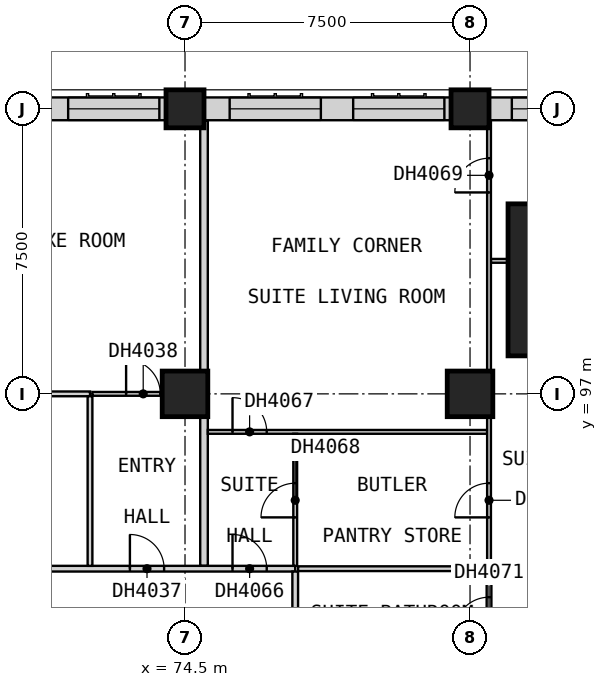
"""IFC4 building model, lengths in metres.
Left out: names, types, materials, properties, quantities, classifications, styles, units other than length and angle.
Written with IfcOpenShell. Run it as: python <this file> out.ifc"""

import sys

from ifc_helpers import new_model, si_unit, direction, frame, frame_2d, origin, origin_2d, place, context, subcontext, project, spatial, rectangle, extrude, element, fill, save


model = new_model("IFC4")
c1 = context("Model", 3, precision=1e-05, world=origin(), true_north=direction((0.0, 1.0)))
c2 = subcontext(c1, "Body", "Model", "MODEL_VIEW")
j1 = project(units=[si_unit("LENGTHUNIT", "METRE"), si_unit("PLANEANGLEUNIT", "RADIAN")], contexts=[c1])
p1 = place(None, origin())
s1 = spatial("IfcSite", under=j1, at=p1, CompositionType="ELEMENT")
p2 = place(p1, origin())
s2 = spatial("IfcBuilding", under=s1, at=p2, CompositionType="ELEMENT")
p3 = place(p2, frame((0.0, 0.0, 44.8)))
s3 = spatial("IfcBuildingStorey", under=s2, at=p3, CompositionType="ELEMENT", Elevation=44.8)
p4 = place(p3, frame((74.5, 97.0, 0.0), z_axis=(0.0, 0.0, 1.0), x_axis=(1.0, 0.0, 0.0)))
e1 = element("IfcColumn", 1, at=p4, inside=s3, PredefinedType="COLUMN", context=c2, shape_type="SweptSolid", body=[
    extrude(rectangle(XDim=1.2, YDim=1.2, at=origin_2d()), origin(), (0.0, 0.0, 1.0), 3.6),
])
p5 = place(p3, frame((74.5, 104.5, 0.0), z_axis=(0.0, 0.0, 1.0), x_axis=(1.0, 0.0, 0.0)))
e2 = element("IfcColumn", 2, at=p5, inside=s3, PredefinedType="COLUMN", context=c2, shape_type="SweptSolid", body=[
    extrude(rectangle(XDim=1.0, YDim=1.0, at=origin_2d()), origin(), (0.0, 0.0, 1.0), 3.6),
])
p6 = place(p3, frame((82.0, 97.0, 0.0), z_axis=(0.0, 0.0, 1.0), x_axis=(1.0, 0.0, 0.0)))
e3 = element("IfcColumn", 3, at=p6, inside=s3, PredefinedType="COLUMN", context=c2, shape_type="SweptSolid", body=[
    extrude(rectangle(XDim=1.2, YDim=1.2, at=origin_2d()), origin(), (0.0, 0.0, 1.0), 3.6),
])
p7 = place(p3, frame((82.0, 104.5, 0.0), z_axis=(0.0, 0.0, 1.0), x_axis=(1.0, 0.0, 0.0)))
e4 = element("IfcColumn", 4, at=p7, inside=s3, PredefinedType="COLUMN", context=c2, shape_type="SweptSolid", body=[
    extrude(rectangle(XDim=1.0, YDim=1.0, at=origin_2d()), origin(), (0.0, 0.0, 1.0), 3.6),
])
p8 = place(p3, frame((85.0, 100.0, 0.0), z_axis=(0.0, 0.0, 1.0), x_axis=(1.0, 0.0, 0.0)))
e5 = element("IfcColumn", 5, at=p8, inside=s3, PredefinedType="COLUMN", context=c2, shape_type="SweptSolid", body=[
    extrude(rectangle(XDim=4.0, YDim=4.0, at=origin_2d()), origin(), (0.0, 0.0, 1.0), 3.6),
])
p9 = place(p3, frame((87.0, 104.5, 0.0), z_axis=(0.0, 0.0, 1.0), x_axis=(-1.0, 0.0, 0.0)))
e6 = element("IfcWall", 6, at=p9, inside=s3, PredefinedType="SOLIDWALL", context=c2, shape_type="SweptSolid", body=[
    extrude(rectangle(XDim=4.5, YDim=0.6, at=frame_2d((2.25, 0.0))), origin(), (0.0, 0.0, 1.0), 3.35),
])
p10 = place(p9, frame((1.5, 0.0, 0.8)))
e7 = element("IfcOpeningElement", 7, at=p10, cuts=e6, PredefinedType="OPENING", context=c2, shape_type="SweptSolid", body=[
    extrude(rectangle(XDim=2.4, YDim=1.8, at=frame_2d((1.2, 0.9))), frame((0.0, 0.31, 0.0), z_axis=(0.0, -1.0, 0.0), x_axis=(1.0, 0.0, 0.0)), (0.0, 0.0, 1.0), 0.62),
])
p11 = place(p3, frame((81.5, 104.5, 0.0), z_axis=(0.0, 0.0, 1.0), x_axis=(-1.0, 0.0, 0.0)))
e8 = element("IfcWall", 8, at=p11, inside=s3, PredefinedType="SOLIDWALL", context=c2, shape_type="SweptSolid", body=[
    extrude(rectangle(XDim=6.5, YDim=0.6, at=frame_2d((3.25, 0.0))), origin(), (0.0, 0.0, 1.0), 2.85),
])
p12 = place(p11, frame((3.425, 0.0, 0.8)))
e9 = element("IfcOpeningElement", 9, at=p12, cuts=e8, PredefinedType="OPENING", context=c2, shape_type="SweptSolid", body=[
    extrude(rectangle(XDim=2.4, YDim=1.8, at=frame_2d((1.2, 0.9))), frame((0.0, 0.31, 0.0), z_axis=(0.0, -1.0, 0.0), x_axis=(1.0, 0.0, 0.0)), (0.0, 0.0, 1.0), 0.62),
])
p13 = place(p11, frame((0.175, 0.0, 0.8)))
e10 = element("IfcOpeningElement", 10, at=p13, cuts=e8, PredefinedType="OPENING", context=c2, shape_type="SweptSolid", body=[
    extrude(rectangle(XDim=2.4, YDim=1.8, at=frame_2d((1.2, 0.9))), frame((0.0, 0.31, 0.0), z_axis=(0.0, -1.0, 0.0), x_axis=(1.0, 0.0, 0.0)), (0.0, 0.0, 1.0), 0.62),
])
p14 = place(p3, frame((74.0, 104.5, 0.0), z_axis=(0.0, 0.0, 1.0), x_axis=(-1.0, 0.0, 0.0)))
e11 = element("IfcWall", 11, at=p14, inside=s3, PredefinedType="SOLIDWALL", context=c2, shape_type="SweptSolid", body=[
    extrude(rectangle(XDim=6.0, YDim=0.6, at=frame_2d((3.0, 0.0))), origin(), (0.0, 0.0, 1.0), 2.85),
])
p15 = place(p14, frame((3.175, 0.0, 0.8)))
e12 = element("IfcOpeningElement", 12, at=p15, cuts=e11, PredefinedType="OPENING", context=c2, shape_type="SweptSolid", body=[
    extrude(rectangle(XDim=2.4, YDim=1.8, at=frame_2d((1.2, 0.9))), frame((0.0, 0.31, 0.0), z_axis=(0.0, -1.0, 0.0), x_axis=(1.0, 0.0, 0.0)), (0.0, 0.0, 1.0), 0.62),
])
p16 = place(p14, frame((0.175, 0.0, 0.8)))
e13 = element("IfcOpeningElement", 13, at=p16, cuts=e11, PredefinedType="OPENING", context=c2, shape_type="SweptSolid", body=[
    extrude(rectangle(XDim=2.4, YDim=1.8, at=frame_2d((1.2, 0.9))), frame((0.0, 0.31, 0.0), z_axis=(0.0, -1.0, 0.0), x_axis=(1.0, 0.0, 0.0)), (0.0, 0.0, 1.0), 0.62),
])
p17 = place(p3, frame((75.0, 92.475, 0.0), z_axis=(0.0, 0.0, 1.0), x_axis=(0.0, 1.0, 0.0)))
e14 = element("IfcWall", 14, at=p17, inside=s3, PredefinedType="PARTITIONING", context=c2, shape_type="SweptSolid", body=[
    extrude(rectangle(XDim=11.715, YDim=0.2, at=frame_2d((5.857, 0.0))), origin(), (0.0, 0.0, 1.0), 3.35),
])
p18 = place(p3, frame((33.75, 92.4, 0.0), z_axis=(0.0, 0.0, 1.0), x_axis=(1.0, 0.0, 0.0)))
e15 = element("IfcWall", 15, at=p18, inside=s3, PredefinedType="PARTITIONING", context=c2, shape_type="SweptSolid", body=[
    extrude(rectangle(XDim=43.65, YDim=0.15, at=frame_2d((21.825, 0.0))), origin(), (0.0, 0.0, 1.0), 3.35),
])
p19 = place(p18, frame((5.175, 0.0, 0.0)))
e16 = element("IfcOpeningElement", 16, at=p19, cuts=e15, PredefinedType="OPENING", context=c2, shape_type="SweptSolid", body=[
    extrude(rectangle(XDim=0.9, YDim=2.1, at=frame_2d((0.45, 1.05))), frame((0.0, 0.085, 0.0), z_axis=(0.0, -1.0, 0.0), x_axis=(1.0, 0.0, 0.0)), (0.0, 0.0, 1.0), 0.17),
])
p20 = place(p18, frame((13.188, 0.0, 0.0)))
e17 = element("IfcOpeningElement", 17, at=p20, cuts=e15, PredefinedType="OPENING", context=c2, shape_type="SweptSolid", body=[
    extrude(rectangle(XDim=1.0, YDim=2.1, at=frame_2d((0.5, 1.05))), frame((0.0, 0.085, 0.0), z_axis=(0.0, -1.0, 0.0), x_axis=(1.0, 0.0, 0.0)), (0.0, 0.0, 1.0), 0.17),
])
p21 = place(p18, frame((20.55, 0.0, 0.0)))
e18 = element("IfcOpeningElement", 18, at=p21, cuts=e15, PredefinedType="OPENING", context=c2, shape_type="SweptSolid", body=[
    extrude(rectangle(XDim=0.9, YDim=2.1, at=frame_2d((0.45, 1.05))), frame((0.0, 0.085, 0.0), z_axis=(0.0, -1.0, 0.0), x_axis=(1.0, 0.0, 0.0)), (0.0, 0.0, 1.0), 0.17),
])
p22 = place(p18, frame((24.863, 0.0, 0.0)))
e19 = element("IfcOpeningElement", 19, at=p22, cuts=e15, PredefinedType="OPENING", context=c2, shape_type="SweptSolid", body=[
    extrude(rectangle(XDim=0.9, YDim=2.1, at=frame_2d((0.45, 1.05))), frame((0.0, 0.085, 0.0), z_axis=(0.0, -1.0, 0.0), x_axis=(1.0, 0.0, 0.0)), (0.0, 0.0, 1.0), 0.17),
])
p23 = place(p18, frame((31.8, 0.0, 0.0)))
e20 = element("IfcOpeningElement", 20, at=p23, cuts=e15, PredefinedType="OPENING", context=c2, shape_type="SweptSolid", body=[
    extrude(rectangle(XDim=0.9, YDim=2.1, at=frame_2d((0.45, 1.05))), frame((0.0, 0.085, 0.0), z_axis=(0.0, -1.0, 0.0), x_axis=(1.0, 0.0, 0.0)), (0.0, 0.0, 1.0), 0.17),
])
p24 = place(p18, frame((39.3, 0.0, 0.0)))
e21 = element("IfcOpeningElement", 21, at=p24, cuts=e15, PredefinedType="OPENING", context=c2, shape_type="SweptSolid", body=[
    extrude(rectangle(XDim=0.9, YDim=2.1, at=frame_2d((0.45, 1.05))), frame((0.0, 0.085, 0.0), z_axis=(0.0, -1.0, 0.0), x_axis=(1.0, 0.0, 0.0)), (0.0, 0.0, 1.0), 0.17),
])
p25 = place(p18, frame((42.0, 0.0, 0.0)))
e22 = element("IfcOpeningElement", 22, at=p25, cuts=e15, PredefinedType="OPENING", context=c2, shape_type="SweptSolid", body=[
    extrude(rectangle(XDim=0.9, YDim=2.1, at=frame_2d((0.45, 1.05))), frame((0.0, 0.085, 0.0), z_axis=(0.0, -1.0, 0.0), x_axis=(1.0, 0.0, 0.0)), (0.0, 0.0, 1.0), 0.17),
])
p26 = place(p3, frame((77.4, 50.175, 0.0), z_axis=(0.0, 0.0, 1.0), x_axis=(0.0, 1.0, 0.0)))
e23 = element("IfcWall", 23, at=p26, inside=s3, PredefinedType="PARTITIONING", context=c2, shape_type="SweptSolid", body=[
    extrude(rectangle(XDim=42.15, YDim=0.15, at=frame_2d((21.075, 0.0))), origin(), (0.0, 0.0, 1.0), 3.35),
])
p27 = place(p26, frame((8.012, 0.0, 0.0)))
e24 = element("IfcOpeningElement", 24, at=p27, cuts=e23, PredefinedType="OPENING", context=c2, shape_type="SweptSolid", body=[
    extrude(rectangle(XDim=1.0, YDim=2.1, at=frame_2d((0.5, 1.05))), frame((0.0, 0.085, 0.0), z_axis=(0.0, -1.0, 0.0), x_axis=(1.0, 0.0, 0.0)), (0.0, 0.0, 1.0), 0.17),
])
p28 = place(p26, frame((12.188, 0.0, 0.0)))
e25 = element("IfcOpeningElement", 25, at=p28, cuts=e23, PredefinedType="OPENING", context=c2, shape_type="SweptSolid", body=[
    extrude(rectangle(XDim=0.9, YDim=2.1, at=frame_2d((0.45, 1.05))), frame((0.0, 0.085, 0.0), z_axis=(0.0, -1.0, 0.0), x_axis=(1.0, 0.0, 0.0)), (0.0, 0.0, 1.0), 0.17),
])
p29 = place(p26, frame((19.125, 0.0, 0.0)))
e26 = element("IfcOpeningElement", 26, at=p29, cuts=e23, PredefinedType="OPENING", context=c2, shape_type="SweptSolid", body=[
    extrude(rectangle(XDim=0.9, YDim=2.1, at=frame_2d((0.45, 1.05))), frame((0.0, 0.085, 0.0), z_axis=(0.0, -1.0, 0.0), x_axis=(1.0, 0.0, 0.0)), (0.0, 0.0, 1.0), 0.17),
])
p30 = place(p26, frame((26.625, 0.0, 0.0)))
e27 = element("IfcOpeningElement", 27, at=p30, cuts=e23, PredefinedType="OPENING", context=c2, shape_type="SweptSolid", body=[
    extrude(rectangle(XDim=0.9, YDim=2.1, at=frame_2d((0.45, 1.05))), frame((0.0, 0.085, 0.0), z_axis=(0.0, -1.0, 0.0), x_axis=(1.0, 0.0, 0.0)), (0.0, 0.0, 1.0), 0.17),
])
p31 = place(p26, frame((30.938, 0.0, 0.0)))
e28 = element("IfcOpeningElement", 28, at=p31, cuts=e23, PredefinedType="OPENING", context=c2, shape_type="SweptSolid", body=[
    extrude(rectangle(XDim=0.9, YDim=2.1, at=frame_2d((0.45, 1.05))), frame((0.0, 0.085, 0.0), z_axis=(0.0, -1.0, 0.0), x_axis=(1.0, 0.0, 0.0)), (0.0, 0.0, 1.0), 0.17),
])
p32 = place(p26, frame((34.688, 0.0, 0.0)))
e29 = element("IfcOpeningElement", 29, at=p32, cuts=e23, PredefinedType="OPENING", context=c2, shape_type="SweptSolid", body=[
    extrude(rectangle(XDim=0.9, YDim=2.1, at=frame_2d((0.45, 1.05))), frame((0.0, 0.085, 0.0), z_axis=(0.0, -1.0, 0.0), x_axis=(1.0, 0.0, 0.0)), (0.0, 0.0, 1.0), 0.17),
])
p33 = place(p26, frame((38.438, 0.0, 0.0)))
e30 = element("IfcOpeningElement", 30, at=p33, cuts=e23, PredefinedType="OPENING", context=c2, shape_type="SweptSolid", body=[
    extrude(rectangle(XDim=0.9, YDim=2.1, at=frame_2d((0.45, 1.05))), frame((0.0, 0.085, 0.0), z_axis=(0.0, -1.0, 0.0), x_axis=(1.0, 0.0, 0.0)), (0.0, 0.0, 1.0), 0.17),
])
p34 = place(p3, frame((75.1, 96.0, 0.0), z_axis=(0.0, 0.0, 1.0), x_axis=(1.0, 0.0, 0.0)))
e31 = element("IfcWall", 31, at=p34, inside=s3, PredefinedType="PARTITIONING", context=c2, shape_type="SweptSolid", body=[
    extrude(rectangle(XDim=7.35, YDim=0.1, at=frame_2d((3.675, 0.0))), origin(), (0.0, 0.0, 1.0), 3.35),
])
p35 = place(p34, frame((0.65, 0.0, 0.0)))
e32 = element("IfcOpeningElement", 32, at=p35, cuts=e31, PredefinedType="OPENING", context=c2, shape_type="SweptSolid", body=[
    extrude(rectangle(XDim=0.9, YDim=2.1, at=frame_2d((0.45, 1.05))), frame((0.0, 0.06, 0.0), z_axis=(0.0, -1.0, 0.0), x_axis=(1.0, 0.0, 0.0)), (0.0, 0.0, 1.0), 0.12),
])
p36 = place(p3, frame((72.062, 97.0, 0.0), z_axis=(0.0, 0.0, 1.0), x_axis=(1.0, 0.0, 0.0)))
e33 = element("IfcWall", 33, at=p36, inside=s3, PredefinedType="PARTITIONING", context=c2, shape_type="SweptSolid", body=[
    extrude(rectangle(XDim=2.837, YDim=0.1, at=frame_2d((1.419, 0.0))), origin(), (0.0, 0.0, 1.0), 3.35),
])
p37 = place(p36, frame((0.887, 0.0, 0.0)))
e34 = element("IfcOpeningElement", 34, at=p37, cuts=e33, PredefinedType="OPENING", context=c2, shape_type="SweptSolid", body=[
    extrude(rectangle(XDim=0.9, YDim=2.1, at=frame_2d((0.45, 1.05))), frame((0.0, 0.06, 0.0), z_axis=(0.0, -1.0, 0.0), x_axis=(1.0, 0.0, 0.0)), (0.0, 0.0, 1.0), 0.12),
])
p38 = place(p3, frame((82.55, 100.5, 0.0), z_axis=(0.0, 0.0, 1.0), x_axis=(1.0, 0.0, 0.0)))
e35 = element("IfcWall", 35, at=p38, inside=s3, PredefinedType="PARTITIONING", context=c2, shape_type="SweptSolid", body=[
    extrude(rectangle(XDim=6.64, YDim=0.1, at=frame_2d((3.32, 0.0))), origin(), (0.0, 0.0, 1.0), 3.35),
])
p39 = place(p3, frame((77.4, 92.475, 0.0), z_axis=(0.0, 0.0, 1.0), x_axis=(0.0, 1.0, 0.0)))
e36 = element("IfcWall", 36, at=p39, inside=s3, PredefinedType="PARTITIONING", context=c2, shape_type="SweptSolid", body=[
    extrude(rectangle(XDim=3.475, YDim=0.1, at=frame_2d((1.737, 0.0))), origin(), (0.0, 0.0, 1.0), 3.35),
])
p40 = place(p39, frame((1.275, 0.0, 0.0)))
e37 = element("IfcOpeningElement", 37, at=p40, cuts=e36, PredefinedType="OPENING", context=c2, shape_type="SweptSolid", body=[
    extrude(rectangle(XDim=0.9, YDim=2.1, at=frame_2d((0.45, 1.05))), frame((0.0, 0.06, 0.0), z_axis=(0.0, -1.0, 0.0), x_axis=(1.0, 0.0, 0.0)), (0.0, 0.0, 1.0), 0.12),
])
p41 = place(p3, frame((82.5, 92.462, 0.0), z_axis=(0.0, 0.0, 1.0), x_axis=(0.0, 1.0, 0.0)))
e38 = element("IfcWall", 38, at=p41, inside=s3, PredefinedType="PARTITIONING", context=c2, shape_type="SweptSolid", body=[
    extrude(rectangle(XDim=11.728, YDim=0.1, at=frame_2d((5.864, 0.0))), origin(), (0.0, 0.0, 1.0), 3.35),
])
p42 = place(p41, frame((9.837, 0.0, 0.0)))
e39 = element("IfcOpeningElement", 39, at=p42, cuts=e38, PredefinedType="OPENING", context=c2, shape_type="SweptSolid", body=[
    extrude(rectangle(XDim=0.9, YDim=2.1, at=frame_2d((0.45, 1.05))), frame((0.0, 0.06, 0.0), z_axis=(0.0, -1.0, 0.0), x_axis=(1.0, 0.0, 0.0)), (0.0, 0.0, 1.0), 0.12),
])
p43 = place(p41, frame((1.288, 0.0, 0.0)))
e40 = element("IfcOpeningElement", 40, at=p43, cuts=e38, PredefinedType="OPENING", context=c2, shape_type="SweptSolid", body=[
    extrude(rectangle(XDim=0.9, YDim=2.1, at=frame_2d((0.45, 1.05))), frame((0.0, 0.06, 0.0), z_axis=(0.0, -1.0, 0.0), x_axis=(1.0, 0.0, 0.0)), (0.0, 0.0, 1.0), 0.12),
])
p44 = place(p3, frame((77.475, 92.4, 0.0), z_axis=(0.0, 0.0, 1.0), x_axis=(1.0, 0.0, 0.0)))
e41 = element("IfcWall", 41, at=p44, inside=s3, PredefinedType="PARTITIONING", context=c2, shape_type="SweptSolid", body=[
    extrude(rectangle(XDim=5.025, YDim=0.125, at=frame_2d((2.512, 0.0))), origin(), (0.0, 0.0, 1.0), 3.35),
])
p45 = place(p3, frame((67.6, 97.0, 0.0), z_axis=(0.0, 0.0, 1.0), x_axis=(1.0, 0.0, 0.0)))
e42 = element("IfcWall", 42, at=p45, inside=s3, PredefinedType="PARTITIONING", context=c2, shape_type="SweptSolid", body=[
    extrude(rectangle(XDim=4.4, YDim=0.125, at=frame_2d((2.2, 0.0))), origin(), (0.0, 0.0, 1.0), 3.35),
])
p46 = place(p45, frame((1.7, 0.0, 0.0)))
e43 = element("IfcOpeningElement", 43, at=p46, cuts=e42, PredefinedType="OPENING", context=c2, shape_type="SweptSolid", body=[
    extrude(rectangle(XDim=0.9, YDim=2.1, at=frame_2d((0.45, 1.05))), frame((0.0, 0.073, 0.0), z_axis=(0.0, -1.0, 0.0), x_axis=(1.0, 0.0, 0.0)), (0.0, 0.0, 1.0), 0.145),
])
p47 = place(p3, frame((72.0, 92.475, 0.0), z_axis=(0.0, 0.0, 1.0), x_axis=(0.0, 1.0, 0.0)))
e44 = element("IfcWall", 44, at=p47, inside=s3, PredefinedType="PARTITIONING", context=c2, shape_type="SweptSolid", body=[
    extrude(rectangle(XDim=4.462, YDim=0.125, at=frame_2d((2.231, 0.0))), origin(), (0.0, 0.0, 1.0), 3.35),
])
p48 = place(p3, frame((82.5, 90.1, 0.0), z_axis=(0.0, 0.0, 1.0), x_axis=(0.0, 1.0, 0.0)))
e45 = element("IfcWall", 45, at=p48, inside=s3, PredefinedType="PARTITIONING", context=c2, shape_type="SweptSolid", body=[
    extrude(rectangle(XDim=2.237, YDim=0.125, at=frame_2d((1.119, 0.0))), origin(), (0.0, 0.0, 1.0), 3.35),
])
p49 = place(p48, frame((0.65, 0.0, 0.0)))
e46 = element("IfcOpeningElement", 46, at=p49, cuts=e45, PredefinedType="OPENING", context=c2, shape_type="SweptSolid", body=[
    extrude(rectangle(XDim=0.9, YDim=2.1, at=frame_2d((0.45, 1.05))), frame((0.0, 0.073, 0.0), z_axis=(0.0, -1.0, 0.0), x_axis=(1.0, 0.0, 0.0)), (0.0, 0.0, 1.0), 0.145),
])
p50 = place(p10, origin())
e47 = element("IfcWindow", 47, at=p50, inside=s3, PartitioningType="SINGLE_PANEL", PredefinedType="WINDOW", context=c2, shape_type="SweptSolid", body=[
    extrude(rectangle(XDim=2.4, YDim=1.8, at=frame_2d((1.2, 0.9))), frame((0.0, -0.07, 0.0), z_axis=(0.0, -1.0, 0.0), x_axis=(1.0, 0.0, 0.0)), (0.0, 0.0, 1.0), 0.06),
])
fill(e7, e47)
p51 = place(p12, origin())
e48 = element("IfcWindow", 48, at=p51, inside=s3, PartitioningType="SINGLE_PANEL", PredefinedType="WINDOW", context=c2, shape_type="SweptSolid", body=[
    extrude(rectangle(XDim=2.4, YDim=1.8, at=frame_2d((1.2, 0.9))), frame((0.0, -0.07, 0.0), z_axis=(0.0, -1.0, 0.0), x_axis=(1.0, 0.0, 0.0)), (0.0, 0.0, 1.0), 0.06),
])
fill(e9, e48)
p52 = place(p13, origin())
e49 = element("IfcWindow", 49, at=p52, inside=s3, PartitioningType="SINGLE_PANEL", PredefinedType="WINDOW", context=c2, shape_type="SweptSolid", body=[
    extrude(rectangle(XDim=2.4, YDim=1.8, at=frame_2d((1.2, 0.9))), frame((0.0, -0.07, 0.0), z_axis=(0.0, -1.0, 0.0), x_axis=(1.0, 0.0, 0.0)), (0.0, 0.0, 1.0), 0.06),
])
fill(e10, e49)
p53 = place(p16, origin())
e50 = element("IfcWindow", 50, at=p53, inside=s3, PartitioningType="SINGLE_PANEL", PredefinedType="WINDOW", context=c2, shape_type="SweptSolid", body=[
    extrude(rectangle(XDim=2.4, YDim=1.8, at=frame_2d((1.2, 0.9))), frame((0.0, -0.07, 0.0), z_axis=(0.0, -1.0, 0.0), x_axis=(1.0, 0.0, 0.0)), (0.0, 0.0, 1.0), 0.06),
])
fill(e13, e50)
p54 = place(p24, origin())
e51 = element("IfcDoor", 51, at=p54, inside=s3, OperationType="SINGLE_SWING_LEFT", PredefinedType="DOOR", context=c2, shape_type="SweptSolid", body=[
    extrude(rectangle(XDim=0.9, YDim=2.1, at=frame_2d((0.45, 1.05))), frame((0.0, 0.025, 0.0), z_axis=(0.0, -1.0, 0.0), x_axis=(1.0, 0.0, 0.0)), (0.0, 0.0, 1.0), 0.05),
])
fill(e21, e51)
p55 = place(p37, origin())
e52 = element("IfcDoor", 52, at=p55, inside=s3, OperationType="SINGLE_SWING_RIGHT", PredefinedType="DOOR", context=c2, shape_type="SweptSolid", body=[
    extrude(rectangle(XDim=0.9, YDim=2.1, at=frame_2d((0.45, 1.05))), frame((0.0, 0.025, 0.0), z_axis=(0.0, -1.0, 0.0), x_axis=(1.0, 0.0, 0.0)), (0.0, 0.0, 1.0), 0.05),
])
fill(e34, e52)
p56 = place(p25, origin())
e53 = element("IfcDoor", 53, at=p56, inside=s3, OperationType="SINGLE_SWING_RIGHT", PredefinedType="DOOR", context=c2, shape_type="SweptSolid", body=[
    extrude(rectangle(XDim=0.9, YDim=2.1, at=frame_2d((0.45, 1.05))), frame((0.0, 0.025, 0.0), z_axis=(0.0, -1.0, 0.0), x_axis=(1.0, 0.0, 0.0)), (0.0, 0.0, 1.0), 0.05),
])
fill(e22, e53)
p57 = place(p35, origin())
e54 = element("IfcDoor", 54, at=p57, inside=s3, OperationType="SINGLE_SWING_LEFT", PredefinedType="DOOR", context=c2, shape_type="SweptSolid", body=[
    extrude(rectangle(XDim=0.9, YDim=2.1, at=frame_2d((0.45, 1.05))), frame((0.0, 0.025, 0.0), z_axis=(0.0, -1.0, 0.0), x_axis=(1.0, 0.0, 0.0)), (0.0, 0.0, 1.0), 0.05),
])
fill(e32, e54)
p58 = place(p40, origin())
e55 = element("IfcDoor", 55, at=p58, inside=s3, OperationType="SINGLE_SWING_RIGHT", PredefinedType="DOOR", context=c2, shape_type="SweptSolid", body=[
    extrude(rectangle(XDim=0.9, YDim=2.1, at=frame_2d((0.45, 1.05))), frame((0.0, 0.025, 0.0), z_axis=(0.0, -1.0, 0.0), x_axis=(1.0, 0.0, 0.0)), (0.0, 0.0, 1.0), 0.05),
])
fill(e37, e55)
p59 = place(p42, origin())
e56 = element("IfcDoor", 56, at=p59, inside=s3, OperationType="SINGLE_SWING_LEFT", PredefinedType="DOOR", context=c2, shape_type="SweptSolid", body=[
    extrude(rectangle(XDim=0.9, YDim=2.1, at=frame_2d((0.45, 1.05))), frame((0.0, 0.025, 0.0), z_axis=(0.0, -1.0, 0.0), x_axis=(1.0, 0.0, 0.0)), (0.0, 0.0, 1.0), 0.05),
])
fill(e39, e56)
p60 = place(p43, origin())
e57 = element("IfcDoor", 57, at=p60, inside=s3, OperationType="SINGLE_SWING_RIGHT", PredefinedType="DOOR", context=c2, shape_type="SweptSolid", body=[
    extrude(rectangle(XDim=0.9, YDim=2.1, at=frame_2d((0.45, 1.05))), frame((0.0, 0.025, 0.0), z_axis=(0.0, -1.0, 0.0), x_axis=(1.0, 0.0, 0.0)), (0.0, 0.0, 1.0), 0.05),
])
fill(e40, e57)
p61 = place(p49, origin())
e58 = element("IfcDoor", 58, at=p61, inside=s3, OperationType="SINGLE_SWING_LEFT", PredefinedType="DOOR", context=c2, shape_type="SweptSolid", body=[
    extrude(rectangle(XDim=0.9, YDim=2.1, at=frame_2d((0.45, 1.05))), frame((0.0, 0.025, 0.0), z_axis=(0.0, -1.0, 0.0), x_axis=(1.0, 0.0, 0.0)), (0.0, 0.0, 1.0), 0.05),
])
fill(e46, e58)
save(model, sys.argv[1])
